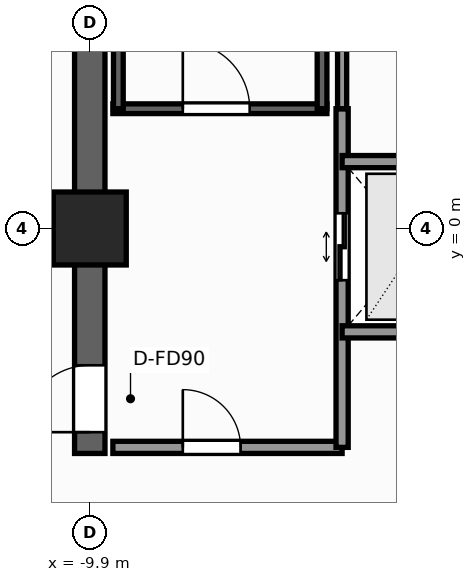
"""IFC4 building model, lengths in metres.
Left out: names, types, materials, properties, quantities, classifications, styles, units other than length and angle.
Written with IfcOpenShell. Run it as: python <this file> out.ifc"""

import sys

from ifc_helpers import new_model, si_unit, direction, frame, frame_2d, origin, origin_2d, place, context, subcontext, project, spatial, rectangle, extrude, element, fill, save


model = new_model("IFC4")
c1 = context("Model", 3, precision=1e-05, world=origin(), true_north=direction((0.0, 1.0)))
c2 = subcontext(c1, "Body", "Model", "MODEL_VIEW")
j1 = project(units=[si_unit("LENGTHUNIT", "METRE"), si_unit("PLANEANGLEUNIT", "RADIAN")], contexts=[c1])
p1 = place(None, origin())
s1 = spatial("IfcSite", under=j1, at=p1, CompositionType="ELEMENT")
p2 = place(p1, origin())
s2 = spatial("IfcBuilding", under=s1, at=p2, CompositionType="ELEMENT")
p3 = place(p2, frame((0.0, 0.0, 152.7)))
s3 = spatial("IfcBuildingStorey", under=s2, at=p3, CompositionType="ELEMENT", Elevation=152.7)
p4 = place(p3, frame((-9.9, -3.7, 0.0), z_axis=(0.0, 0.0, 1.0), x_axis=(0.0, 1.0, 0.0)))
e1 = element("IfcWall", 1, at=p4, inside=s3, PredefinedType="SHEAR", context=c2, shape_type="SweptSolid", body=[
    extrude(rectangle(XDim=13.35, YDim=0.5, at=frame_2d((6.675, 0.0))), origin(), (0.0, 0.0, 1.0), 4.2),
])
p5 = place(p4, frame((0.35, 0.0, 0.0)))
e2 = element("IfcOpeningElement", 2, at=p5, cuts=e1, PredefinedType="OPENING", context=c2, shape_type="SweptSolid", body=[
    extrude(rectangle(XDim=1.1, YDim=2.2, at=frame_2d((0.55, 1.1))), frame((0.0, 0.26, 0.0), z_axis=(0.0, -1.0, 0.0), x_axis=(1.0, 0.0, 0.0)), (0.0, 0.0, 1.0), 0.52),
])
p6 = place(p3, frame((-9.9, 0.0, 0.0), z_axis=(0.0, 0.0, 1.0), x_axis=(1.0, 0.0, 0.0)))
e3 = element("IfcColumn", 3, at=p6, inside=s3, PredefinedType="COLUMN", context=c2, shape_type="SweptSolid", body=[
    extrude(rectangle(XDim=1.2, YDim=1.2, at=origin_2d()), origin(), (0.0, 0.0, 1.0), 4.2),
])
p7 = place(p3, frame((-9.52, 1.97, 0.0), z_axis=(0.0, 0.0, 1.0), x_axis=(1.0, 0.0, 0.0)))
e4 = element("IfcWall", 4, at=p7, inside=s3, PredefinedType="SHEAR", context=c2, shape_type="SweptSolid", body=[
    extrude(rectangle(XDim=3.52, YDim=0.16, at=frame_2d((1.76, 0.0))), origin(), (0.0, 0.0, 1.0), 4.2),
])
p8 = place(p7, frame((1.15, 0.0, 0.0)))
e5 = element("IfcOpeningElement", 5, at=p8, cuts=e4, PredefinedType="OPENING", context=c2, shape_type="SweptSolid", body=[
    extrude(rectangle(XDim=1.1, YDim=2.2, at=frame_2d((0.55, 1.1))), frame((0.0, 0.09, 0.0), z_axis=(0.0, -1.0, 0.0), x_axis=(1.0, 0.0, 0.0)), (0.0, 0.0, 1.0), 0.18),
])
for number, where, z_axis, x_axis in (
    (6, (-9.43, 1.97, 0.0), (0.0, 0.0, 1.0), (0.0, 1.0, 0.0)),
    (7, (-6.08, 1.97, 0.0), (0.0, 0.0, 1.0), (0.0, 1.0, 0.0)),
):
    element("IfcWall", number, at=place(p3, frame(where, z_axis=z_axis, x_axis=x_axis)), inside=s3, PredefinedType="SHEAR", context=c2, shape_type="SweptSolid", body=[
        extrude(rectangle(XDim=7.56, YDim=0.16, at=frame_2d((3.78, 0.0))), origin(), (0.0, 0.0, 1.0), 4.2),
    ])
p9 = place(p3, frame((-9.52, -3.6, 0.0), z_axis=(0.0, 0.0, 1.0), x_axis=(1.0, 0.0, 0.0)))
e8 = element("IfcWall", 8, at=p9, inside=s3, PredefinedType="SOLIDWALL", context=c2, shape_type="SweptSolid", body=[
    extrude(rectangle(XDim=3.77, YDim=0.2, at=frame_2d((1.885, 0.0))), origin(), (0.0, 0.0, 1.0), 4.0),
])
p10 = place(p9, frame((1.15, 0.0, 0.0)))
e9 = element("IfcOpeningElement", 9, at=p10, cuts=e8, PredefinedType="OPENING", context=c2, shape_type="SweptSolid", body=[
    extrude(rectangle(XDim=0.95, YDim=2.06, at=frame_2d((0.475, 1.03))), frame((0.0, 0.11, 0.0), z_axis=(0.0, -1.0, 0.0), x_axis=(1.0, 0.0, 0.0)), (0.0, 0.0, 1.0), 0.22),
])
p11 = place(p3, frame((-5.75, -3.6, 0.0), z_axis=(0.0, 0.0, 1.0), x_axis=(0.0, 1.0, 0.0)))
e10 = element("IfcWall", 10, at=p11, inside=s3, PredefinedType="SOLIDWALL", context=c2, shape_type="SweptSolid", body=[
    extrude(rectangle(XDim=5.57, YDim=0.2, at=frame_2d((2.785, 0.0))), origin(), (0.0, 0.0, 1.0), 3.635),
])
p12 = place(p11, frame((2.75, 0.0, 0.0)))
e11 = element("IfcOpeningElement", 11, at=p12, cuts=e10, PredefinedType="OPENING", context=c2, shape_type="SweptSolid", body=[
    extrude(rectangle(XDim=1.1, YDim=2.2, at=frame_2d((0.55, 1.1))), frame((0.0, 0.11, 0.0), z_axis=(0.0, -1.0, 0.0), x_axis=(1.0, 0.0, 0.0)), (0.0, 0.0, 1.0), 0.22),
])
for number, where, z_axis, x_axis in (
    (12, (-5.75, -1.7, 0.0), (0.0, 0.0, 1.0), (1.0, 0.0, 0.0)),
    (13, (-5.75, 1.1, 0.0), (0.0, 0.0, 1.0), (1.0, 0.0, 0.0)),
):
    element("IfcWall", number, at=place(p3, frame(where, z_axis=z_axis, x_axis=x_axis)), inside=s3, PredefinedType="SOLIDWALL", context=c2, shape_type="SweptSolid", body=[
        extrude(rectangle(XDim=2.4, YDim=0.2, at=frame_2d((1.2, 0.0))), origin(), (0.0, 0.0, 1.0), 4.0),
    ])
p13 = place(p3, frame((-5.75, 1.97, 0.0), z_axis=(0.0, 0.0, 1.0), x_axis=(0.0, 1.0, 0.0)))
e14 = element("IfcWall", 14, at=p13, inside=s3, PredefinedType="PARTITIONING", context=c2, shape_type="SweptSolid", body=[
    extrude(rectangle(XDim=2.33, YDim=0.15, at=frame_2d((1.165, 0.0))), origin(), (0.0, 0.0, 1.0), 3.635),
])
p14 = place(p8, origin())
e15 = element("IfcDoor", 15, at=p14, inside=s3, OperationType="SINGLE_SWING_LEFT", PredefinedType="DOOR", context=c2, shape_type="SweptSolid", body=[
    extrude(rectangle(XDim=1.1, YDim=2.2, at=frame_2d((0.55, 1.1))), frame((0.0, 0.025, 0.0), z_axis=(0.0, -1.0, 0.0), x_axis=(1.0, 0.0, 0.0)), (0.0, 0.0, 1.0), 0.05),
])
fill(e5, e15)
p15 = place(p5, origin())
e16 = element("IfcDoor", 16, at=p15, inside=s3, OperationType="SINGLE_SWING_LEFT", PredefinedType="DOOR", context=c2, shape_type="SweptSolid", body=[
    extrude(rectangle(XDim=1.1, YDim=2.2, at=frame_2d((0.55, 1.1))), frame((0.0, 0.025, 0.0), z_axis=(0.0, -1.0, 0.0), x_axis=(1.0, 0.0, 0.0)), (0.0, 0.0, 1.0), 0.05),
])
fill(e2, e16)
p16 = place(p12, origin())
e17 = element("IfcDoor", 17, at=p16, inside=s3, OperationType="DOUBLE_DOOR_SLIDING", PredefinedType="DOOR", context=c2, shape_type="SweptSolid", body=[
    extrude(rectangle(XDim=1.1, YDim=2.2, at=frame_2d((0.55, 1.1))), frame((0.0, 0.025, 0.0), z_axis=(0.0, -1.0, 0.0), x_axis=(1.0, 0.0, 0.0)), (0.0, 0.0, 1.0), 0.05),
])
fill(e11, e17)
p17 = place(p10, origin())
e18 = element("IfcDoor", 18, at=p17, inside=s3, OperationType="SINGLE_SWING_LEFT", PredefinedType="DOOR", context=c2, shape_type="SweptSolid", body=[
    extrude(rectangle(XDim=0.95, YDim=2.06, at=frame_2d((0.475, 1.03))), frame((0.0, 0.025, 0.0), z_axis=(0.0, -1.0, 0.0), x_axis=(1.0, 0.0, 0.0)), (0.0, 0.0, 1.0), 0.05),
])
fill(e9, e18)
save(model, sys.argv[1])
